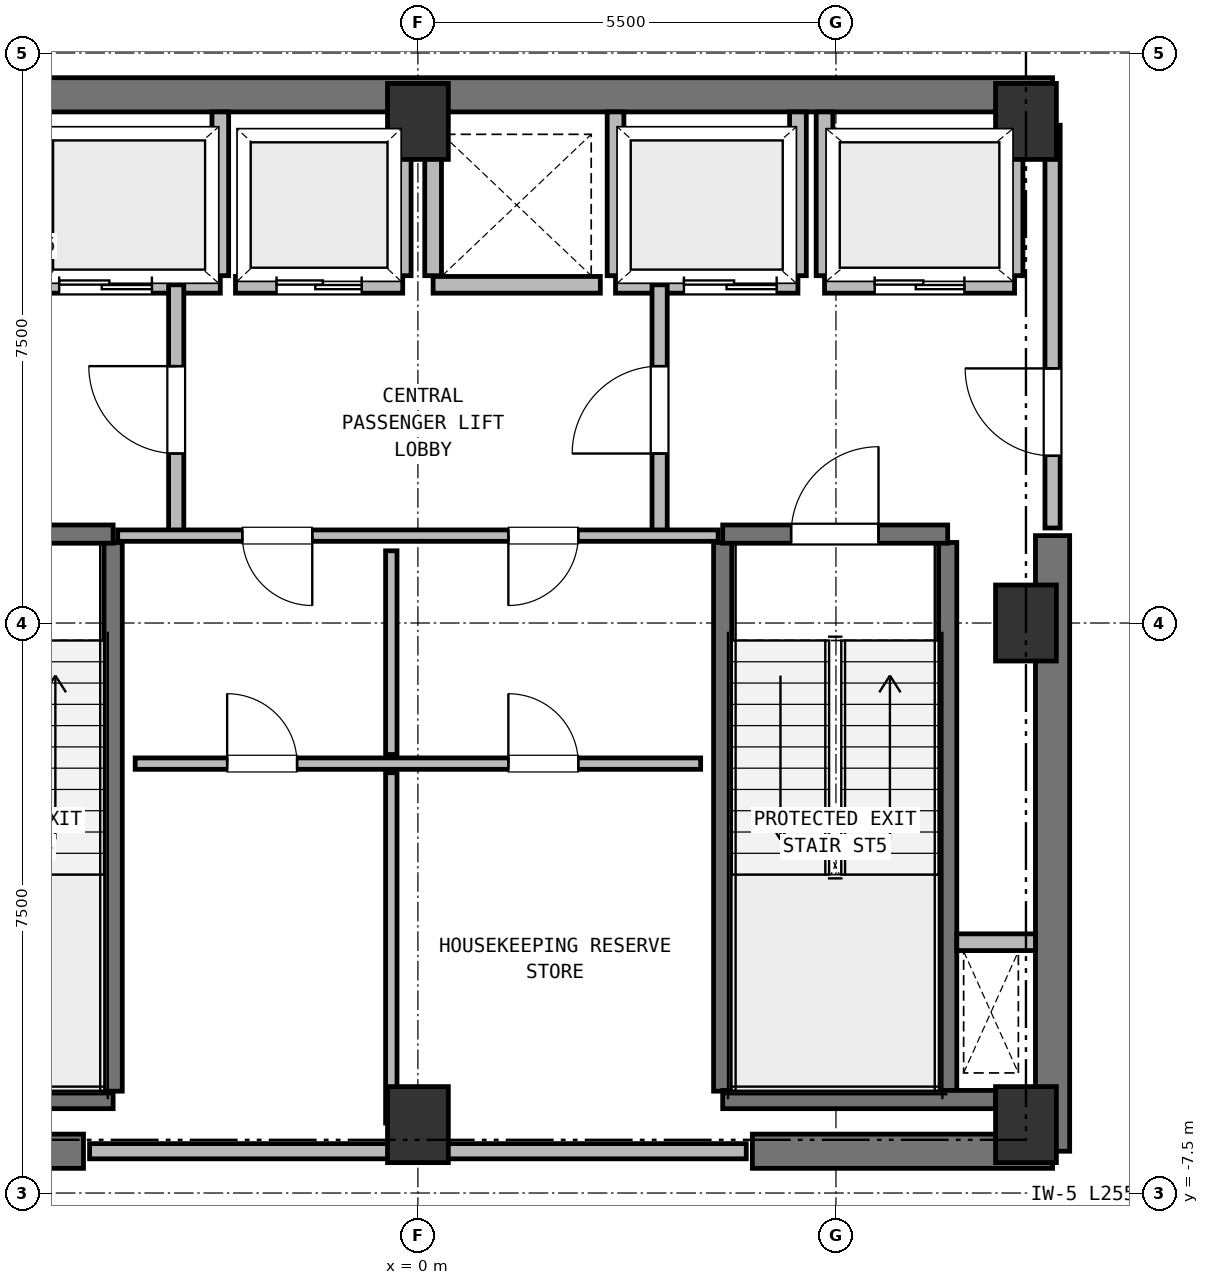
"""IFC4 building model, lengths in metres.
Left out: names, types, materials, properties, quantities, classifications, styles, units other than length and angle.
Written with IfcOpenShell. Run it as: python <this file> out.ifc"""

import sys

from ifc_helpers import new_model, si_unit, direction, frame, frame_2d, origin, origin_2d, place, context, subcontext, project, spatial, rectangle, extrude, element, fill, save


model = new_model("IFC4")
c1 = context("Model", 3, precision=1e-05, world=origin(), true_north=direction((0.0, 1.0)))
c2 = subcontext(c1, "Body", "Model", "MODEL_VIEW")
j1 = project(units=[si_unit("LENGTHUNIT", "METRE"), si_unit("PLANEANGLEUNIT", "RADIAN")], contexts=[c1])
p1 = place(None, origin())
s1 = spatial("IfcSite", under=j1, at=p1, CompositionType="ELEMENT")
p2 = place(p1, origin())
s2 = spatial("IfcBuilding", under=s1, at=p2, CompositionType="ELEMENT")
p3 = place(p2, frame((0.0, 0.0, 260.2)))
s3 = spatial("IfcBuildingStorey", under=s2, at=p3, CompositionType="ELEMENT", Elevation=260.2)
for number, where, z_axis, x_axis in (
    (1, (0.0, -6.6, 0.0), (0.0, 0.0, 1.0), (1.0, 0.0, 0.0)),
    (2, (8.0, -6.6, 0.0), (0.0, 0.0, 1.0), (1.0, 0.0, 0.0)),
    (3, (8.0, 0.0, 0.0), (0.0, 0.0, 1.0), (1.0, 0.0, 0.0)),
    (4, (8.0, 6.6, 0.0), (0.0, 0.0, 1.0), (1.0, 0.0, 0.0)),
    (5, (0.0, 6.6, 0.0), (0.0, 0.0, 1.0), (1.0, 0.0, 0.0)),
):
    element("IfcColumn", number, at=place(p3, frame(where, z_axis=z_axis, x_axis=x_axis)), inside=s3, PredefinedType="COLUMN", context=c2, shape_type="SweptSolid", body=[
        extrude(rectangle(XDim=0.8, YDim=1.0, at=origin_2d()), origin(), (0.0, 0.0, 1.0), 4.2),
    ])
p4 = place(p3, frame((-8.35, 6.95, 0.0), z_axis=(0.0, 0.0, 1.0), x_axis=(1.0, 0.0, 0.0)))
e6 = element("IfcWall", 6, at=p4, inside=s3, PredefinedType="SHEAR", context=c2, shape_type="SweptSolid", body=[
    extrude(rectangle(XDim=16.7, YDim=0.45, at=frame_2d((8.35, 0.0))), origin(), (0.0, 0.0, 1.0), 3.95),
])
for number, where, z_axis, x_axis in (
    (7, (-8.35, -6.95, 0.0), (0.0, 0.0, 1.0), (1.0, 0.0, 0.0)),
    (8, (4.4, -6.95, 0.0), (0.0, 0.0, 1.0), (1.0, 0.0, 0.0)),
):
    element("IfcWall", number, at=place(p3, frame(where, z_axis=z_axis, x_axis=x_axis)), inside=s3, PredefinedType="SHEAR", context=c2, shape_type="SweptSolid", body=[
        extrude(rectangle(XDim=3.95, YDim=0.45, at=frame_2d((1.975, 0.0))), origin(), (0.0, 0.0, 1.0), 3.95),
    ])
p5 = place(p3, frame((8.35, -6.95, 0.0), z_axis=(0.0, 0.0, 1.0), x_axis=(0.0, 1.0, 0.0)))
e9 = element("IfcWall", 9, at=p5, inside=s3, PredefinedType="SHEAR", context=c2, shape_type="SweptSolid", body=[
    extrude(rectangle(XDim=8.1, YDim=0.45, at=frame_2d((4.05, 0.0))), origin(), (0.0, 0.0, 1.0), 3.95),
])
p6 = place(p3, frame((-7.6, -6.27, 0.0), z_axis=(0.0, 0.0, 1.0), x_axis=(1.0, 0.0, 0.0)))
e10 = element("IfcWall", 10, at=p6, inside=s3, PredefinedType="SHEAR", context=c2, shape_type="SweptSolid", body=[
    extrude(rectangle(XDim=3.59, YDim=0.24, at=frame_2d((1.795, 0.0))), origin(), (0.0, 0.0, 1.0), 3.95),
])
p7 = place(p3, frame((-4.01, -6.16, 0.0), z_axis=(0.0, 0.0, 1.0), x_axis=(0.0, 1.0, 0.0)))
e11 = element("IfcWall", 11, at=p7, inside=s3, PredefinedType="SHEAR", context=c2, shape_type="SweptSolid", body=[
    extrude(rectangle(XDim=7.22, YDim=0.24, at=frame_2d((3.61, 0.0))), origin(), (0.0, 0.0, 1.0), 3.95),
])
p8 = place(p3, frame((-6.97, 1.17, 0.0), z_axis=(0.0, 0.0, 1.0), x_axis=(1.0, 0.0, 0.0)))
e12 = element("IfcWall", 12, at=p8, inside=s3, PredefinedType="SHEAR", context=c2, shape_type="SweptSolid", body=[
    extrude(rectangle(XDim=2.96, YDim=0.24, at=frame_2d((1.48, 0.0))), origin(), (0.0, 0.0, 1.0), 3.95),
])
p9 = place(p8, frame((0.9, 0.0, 0.0)))
e13 = element("IfcOpeningElement", 13, at=p9, cuts=e12, PredefinedType="OPENING", context=c2, shape_type="SweptSolid", body=[
    extrude(rectangle(XDim=1.15, YDim=2.15, at=frame_2d((0.575, 1.075))), frame((0.0, 0.13, 0.0), z_axis=(0.0, -1.0, 0.0), x_axis=(1.0, 0.0, 0.0)), (0.0, 0.0, 1.0), 0.26),
])
for number, where, z_axis, x_axis in (
    (14, (4.01, -6.16, 0.0), (0.0, 0.0, 1.0), (0.0, 1.0, 0.0)),
    (15, (6.97, -6.16, 0.0), (0.0, 0.0, 1.0), (0.0, 1.0, 0.0)),
):
    element("IfcWall", number, at=place(p3, frame(where, z_axis=z_axis, x_axis=x_axis)), inside=s3, PredefinedType="SHEAR", context=c2, shape_type="SweptSolid", body=[
        extrude(rectangle(XDim=7.22, YDim=0.24, at=frame_2d((3.61, 0.0))), origin(), (0.0, 0.0, 1.0), 3.95),
    ])
p10 = place(p3, frame((4.01, -6.27, 0.0), z_axis=(0.0, 0.0, 1.0), x_axis=(1.0, 0.0, 0.0)))
e16 = element("IfcWall", 16, at=p10, inside=s3, PredefinedType="SHEAR", context=c2, shape_type="SweptSolid", body=[
    extrude(rectangle(XDim=3.59, YDim=0.24, at=frame_2d((1.795, 0.0))), origin(), (0.0, 0.0, 1.0), 3.95),
])
p11 = place(p3, frame((4.01, 1.17, 0.0), z_axis=(0.0, 0.0, 1.0), x_axis=(1.0, 0.0, 0.0)))
e17 = element("IfcWall", 17, at=p11, inside=s3, PredefinedType="SHEAR", context=c2, shape_type="SweptSolid", body=[
    extrude(rectangle(XDim=2.96, YDim=0.24, at=frame_2d((1.48, 0.0))), origin(), (0.0, 0.0, 1.0), 3.95),
])
p12 = place(p11, frame((0.9, 0.0, 0.0)))
e18 = element("IfcOpeningElement", 18, at=p12, cuts=e17, PredefinedType="OPENING", context=c2, shape_type="SweptSolid", body=[
    extrude(rectangle(XDim=1.15, YDim=2.15, at=frame_2d((0.575, 1.075))), frame((0.0, 0.13, 0.0), z_axis=(0.0, -1.0, 0.0), x_axis=(1.0, 0.0, 0.0)), (0.0, 0.0, 1.0), 0.26),
])
p13 = place(p3, frame((7.09, -4.2, 0.0), z_axis=(0.0, 0.0, 1.0), x_axis=(1.0, 0.0, 0.0)))
e19 = element("IfcWall", 19, at=p13, inside=s3, PredefinedType="PARTITIONING", context=c2, shape_type="SweptSolid", body=[
    extrude(rectangle(XDim=1.035, YDim=0.22, at=frame_2d((0.518, 0.0))), origin(), (0.0, 0.0, 1.0), 3.95),
])
p14 = place(p3, frame((5.35, 4.45, 0.0), z_axis=(0.0, 0.0, 1.0), x_axis=(1.0, 0.0, 0.0)))
e20 = element("IfcWall", 20, at=p14, inside=s3, PredefinedType="PARTITIONING", context=c2, shape_type="SweptSolid", body=[
    extrude(rectangle(XDim=2.5, YDim=0.22, at=frame_2d((1.25, 0.0))), origin(), (0.0, 0.0, 1.0), 3.95),
])
p15 = place(p14, frame((0.66, 0.0, 0.0)))
e21 = element("IfcOpeningElement", 21, at=p15, cuts=e20, PredefinedType="OPENING", context=c2, shape_type="SweptSolid", body=[
    extrude(rectangle(XDim=1.18, YDim=2.15, at=frame_2d((0.59, 1.075))), frame((0.0, 0.12, 0.0), z_axis=(0.0, -1.0, 0.0), x_axis=(1.0, 0.0, 0.0)), (0.0, 0.0, 1.0), 0.24),
])
p16 = place(p3, frame((5.35, 4.57, 0.0), z_axis=(0.0, 0.0, 1.0), x_axis=(0.0, 1.0, 0.0)))
e22 = element("IfcWall", 22, at=p16, inside=s3, PredefinedType="PARTITIONING", context=c2, shape_type="SweptSolid", body=[
    extrude(rectangle(XDim=2.155, YDim=0.22, at=frame_2d((1.078, 0.0))), origin(), (0.0, 0.0, 1.0), 3.95),
])
p17 = place(p3, frame((7.85, 4.57, 0.0), z_axis=(0.0, 0.0, 1.0), x_axis=(0.0, 1.0, 0.0)))
e23 = element("IfcWall", 23, at=p17, inside=s3, PredefinedType="PARTITIONING", context=c2, shape_type="SweptSolid", body=[
    extrude(rectangle(XDim=2.155, YDim=0.22, at=frame_2d((1.078, 0.0))), origin(), (0.0, 0.0, 1.0), 3.63),
])
p18 = place(p3, frame((-5.0, 4.45, 0.0), z_axis=(0.0, 0.0, 1.0), x_axis=(1.0, 0.0, 0.0)))
e24 = element("IfcWall", 24, at=p18, inside=s3, PredefinedType="PARTITIONING", context=c2, shape_type="SweptSolid", body=[
    extrude(rectangle(XDim=2.4, YDim=0.22, at=frame_2d((1.2, 0.0))), origin(), (0.0, 0.0, 1.0), 3.95),
])
p19 = place(p18, frame((0.28, 0.0, 0.0)))
e25 = element("IfcOpeningElement", 25, at=p19, cuts=e24, PredefinedType="OPENING", context=c2, shape_type="SweptSolid", body=[
    extrude(rectangle(XDim=1.22, YDim=2.15, at=frame_2d((0.61, 1.075))), frame((0.0, 0.12, 0.0), z_axis=(0.0, -1.0, 0.0), x_axis=(1.0, 0.0, 0.0)), (0.0, 0.0, 1.0), 0.24),
])
p20 = place(p3, frame((-2.6, 4.57, 0.0), z_axis=(0.0, 0.0, 1.0), x_axis=(0.0, 1.0, 0.0)))
e26 = element("IfcWall", 26, at=p20, inside=s3, PredefinedType="PARTITIONING", context=c2, shape_type="SweptSolid", body=[
    extrude(rectangle(XDim=2.155, YDim=0.22, at=frame_2d((1.078, 0.0))), origin(), (0.0, 0.0, 1.0), 3.95),
])
p21 = place(p3, frame((2.6, 4.45, 0.0), z_axis=(0.0, 0.0, 1.0), x_axis=(1.0, 0.0, 0.0)))
e27 = element("IfcWall", 27, at=p21, inside=s3, PredefinedType="PARTITIONING", context=c2, shape_type="SweptSolid", body=[
    extrude(rectangle(XDim=2.4, YDim=0.22, at=frame_2d((1.2, 0.0))), origin(), (0.0, 0.0, 1.0), 3.95),
])
p22 = place(p21, frame((0.9, 0.0, 0.0)))
e28 = element("IfcOpeningElement", 28, at=p22, cuts=e27, PredefinedType="OPENING", context=c2, shape_type="SweptSolid", body=[
    extrude(rectangle(XDim=1.22, YDim=2.15, at=frame_2d((0.61, 1.075))), frame((0.0, 0.12, 0.0), z_axis=(0.0, -1.0, 0.0), x_axis=(1.0, 0.0, 0.0)), (0.0, 0.0, 1.0), 0.24),
])
for number, where, z_axis, x_axis in (
    (29, (2.6, 4.57, 0.0), (0.0, 0.0, 1.0), (0.0, 1.0, 0.0)),
    (30, (5.0, 4.57, 0.0), (0.0, 0.0, 1.0), (0.0, 1.0, 0.0)),
):
    element("IfcWall", number, at=place(p3, frame(where, z_axis=z_axis, x_axis=x_axis)), inside=s3, PredefinedType="PARTITIONING", context=c2, shape_type="SweptSolid", body=[
        extrude(rectangle(XDim=2.155, YDim=0.22, at=frame_2d((1.078, 0.0))), origin(), (0.0, 0.0, 1.0), 3.95),
    ])
p23 = place(p3, frame((-2.4, 4.45, 0.0), z_axis=(0.0, 0.0, 1.0), x_axis=(1.0, 0.0, 0.0)))
e31 = element("IfcWall", 31, at=p23, inside=s3, PredefinedType="PARTITIONING", context=c2, shape_type="SweptSolid", body=[
    extrude(rectangle(XDim=2.2, YDim=0.22, at=frame_2d((1.1, 0.0))), origin(), (0.0, 0.0, 1.0), 3.95),
])
p24 = place(p23, frame((0.54, 0.0, 0.0)))
e32 = element("IfcOpeningElement", 32, at=p24, cuts=e31, PredefinedType="OPENING", context=c2, shape_type="SweptSolid", body=[
    extrude(rectangle(XDim=1.12, YDim=2.15, at=frame_2d((0.56, 1.075))), frame((0.0, 0.12, 0.0), z_axis=(0.0, -1.0, 0.0), x_axis=(1.0, 0.0, 0.0)), (0.0, 0.0, 1.0), 0.24),
])
p25 = place(p3, frame((-0.2, 4.57, 0.0), z_axis=(0.0, 0.0, 1.0), x_axis=(0.0, 1.0, 0.0)))
e33 = element("IfcWall", 33, at=p25, inside=s3, PredefinedType="PARTITIONING", context=c2, shape_type="SweptSolid", body=[
    extrude(rectangle(XDim=2.155, YDim=0.22, at=frame_2d((1.078, 0.0))), origin(), (0.0, 0.0, 1.0), 3.95),
])
p26 = place(p3, frame((0.2, 4.45, 0.0), z_axis=(0.0, 0.0, 1.0), x_axis=(1.0, 0.0, 0.0)))
e34 = element("IfcWall", 34, at=p26, inside=s3, PredefinedType="PARTITIONING", context=c2, shape_type="SweptSolid", body=[
    extrude(rectangle(XDim=2.2, YDim=0.22, at=frame_2d((1.1, 0.0))), origin(), (0.0, 0.0, 1.0), 3.95),
])
p27 = place(p3, frame((0.2, 4.57, 0.0), z_axis=(0.0, 0.0, 1.0), x_axis=(0.0, 1.0, 0.0)))
e35 = element("IfcWall", 35, at=p27, inside=s3, PredefinedType="PARTITIONING", context=c2, shape_type="SweptSolid", body=[
    extrude(rectangle(XDim=2.155, YDim=0.22, at=frame_2d((1.078, 0.0))), origin(), (0.0, 0.0, 1.0), 3.95),
])
p28 = place(p3, frame((-3.18, 1.15, 0.0), z_axis=(0.0, 0.0, 1.0), x_axis=(0.0, 1.0, 0.0)))
e36 = element("IfcWall", 36, at=p28, inside=s3, PredefinedType="PARTITIONING", context=c2, shape_type="SweptSolid", body=[
    extrude(rectangle(XDim=3.3, YDim=0.2, at=frame_2d((1.65, 0.0))), origin(), (0.0, 0.0, 1.0), 3.95),
])
p29 = place(p28, frame((1.08, 0.0, 0.0)))
e37 = element("IfcOpeningElement", 37, at=p29, cuts=e36, PredefinedType="OPENING", context=c2, shape_type="SweptSolid", body=[
    extrude(rectangle(XDim=1.15, YDim=2.15, at=frame_2d((0.575, 1.075))), frame((0.0, 0.11, 0.0), z_axis=(0.0, -1.0, 0.0), x_axis=(1.0, 0.0, 0.0)), (0.0, 0.0, 1.0), 0.22),
])
p30 = place(p3, frame((3.18, 1.15, 0.0), z_axis=(0.0, 0.0, 1.0), x_axis=(0.0, 1.0, 0.0)))
e38 = element("IfcWall", 38, at=p30, inside=s3, PredefinedType="PARTITIONING", context=c2, shape_type="SweptSolid", body=[
    extrude(rectangle(XDim=3.3, YDim=0.2, at=frame_2d((1.65, 0.0))), origin(), (0.0, 0.0, 1.0), 3.95),
])
p31 = place(p30, frame((1.08, 0.0, 0.0)))
e39 = element("IfcOpeningElement", 39, at=p31, cuts=e38, PredefinedType="OPENING", context=c2, shape_type="SweptSolid", body=[
    extrude(rectangle(XDim=1.15, YDim=2.15, at=frame_2d((0.575, 1.075))), frame((0.0, 0.11, 0.0), z_axis=(0.0, -1.0, 0.0), x_axis=(1.0, 0.0, 0.0)), (0.0, 0.0, 1.0), 0.22),
])
p32 = place(p3, frame((8.35, 1.25, 0.0), z_axis=(0.0, 0.0, 1.0), x_axis=(0.0, 1.0, 0.0)))
e40 = element("IfcWall", 40, at=p32, inside=s3, PredefinedType="PARTITIONING", context=c2, shape_type="SweptSolid", body=[
    extrude(rectangle(XDim=5.3, YDim=0.2, at=frame_2d((2.65, 0.0))), origin(), (0.0, 0.0, 1.0), 3.95),
])
p33 = place(p32, frame((0.95, 0.0, 0.0)))
e41 = element("IfcOpeningElement", 41, at=p33, cuts=e40, PredefinedType="OPENING", context=c2, shape_type="SweptSolid", body=[
    extrude(rectangle(XDim=1.15, YDim=2.15, at=frame_2d((0.575, 1.075))), frame((0.0, 0.11, 0.0), z_axis=(0.0, -1.0, 0.0), x_axis=(1.0, 0.0, 0.0)), (0.0, 0.0, 1.0), 0.22),
])
p34 = place(p3, frame((3.95, 1.15, 0.0), z_axis=(0.0, 0.0, 1.0), x_axis=(-1.0, 0.0, 0.0)))
e42 = element("IfcWall", 42, at=p34, inside=s3, PredefinedType="PARTITIONING", context=c2, shape_type="SweptSolid", body=[
    extrude(rectangle(XDim=7.9, YDim=0.15, at=frame_2d((3.95, 0.0))), origin(), (0.0, 0.0, 1.0), 3.95),
])
p35 = place(p34, frame((5.34, 0.0, 0.0)))
e43 = element("IfcOpeningElement", 43, at=p35, cuts=e42, PredefinedType="OPENING", context=c2, shape_type="SweptSolid", body=[
    extrude(rectangle(XDim=0.92, YDim=2.05, at=frame_2d((0.46, 1.025))), frame((0.0, 0.085, 0.0), z_axis=(0.0, -1.0, 0.0), x_axis=(1.0, 0.0, 0.0)), (0.0, 0.0, 1.0), 0.17),
])
p36 = place(p34, frame((1.84, 0.0, 0.0)))
e44 = element("IfcOpeningElement", 44, at=p36, cuts=e42, PredefinedType="OPENING", context=c2, shape_type="SweptSolid", body=[
    extrude(rectangle(XDim=0.92, YDim=2.05, at=frame_2d((0.46, 1.025))), frame((0.0, 0.085, 0.0), z_axis=(0.0, -1.0, 0.0), x_axis=(1.0, 0.0, 0.0)), (0.0, 0.0, 1.0), 0.17),
])
p37 = place(p3, frame((-4.32, -6.95, 0.0), z_axis=(0.0, 0.0, 1.0), x_axis=(1.0, 0.0, 0.0)))
e45 = element("IfcWall", 45, at=p37, inside=s3, PredefinedType="PARTITIONING", context=c2, shape_type="SweptSolid", body=[
    extrude(rectangle(XDim=8.64, YDim=0.2, at=frame_2d((4.32, 0.0))), origin(), (0.0, 0.0, 1.0), 3.95),
])
p38 = place(p3, frame((-3.72, -1.85, 0.0), z_axis=(0.0, 0.0, 1.0), x_axis=(1.0, 0.0, 0.0)))
e46 = element("IfcWall", 46, at=p38, inside=s3, PredefinedType="PARTITIONING", context=c2, shape_type="SweptSolid", body=[
    extrude(rectangle(XDim=7.44, YDim=0.15, at=frame_2d((3.72, 0.0))), origin(), (0.0, 0.0, 1.0), 3.95),
])
p39 = place(p38, frame((1.21, 0.0, 0.0)))
e47 = element("IfcOpeningElement", 47, at=p39, cuts=e46, PredefinedType="OPENING", context=c2, shape_type="SweptSolid", body=[
    extrude(rectangle(XDim=0.92, YDim=2.05, at=frame_2d((0.46, 1.025))), frame((0.0, 0.085, 0.0), z_axis=(0.0, -1.0, 0.0), x_axis=(1.0, 0.0, 0.0)), (0.0, 0.0, 1.0), 0.17),
])
p40 = place(p38, frame((4.91, 0.0, 0.0)))
e48 = element("IfcOpeningElement", 48, at=p40, cuts=e46, PredefinedType="OPENING", context=c2, shape_type="SweptSolid", body=[
    extrude(rectangle(XDim=0.92, YDim=2.05, at=frame_2d((0.46, 1.025))), frame((0.0, 0.085, 0.0), z_axis=(0.0, -1.0, 0.0), x_axis=(1.0, 0.0, 0.0)), (0.0, 0.0, 1.0), 0.17),
])
p41 = place(p3, frame((-0.35, -6.58, 0.0), z_axis=(0.0, 0.0, 1.0), x_axis=(0.0, 1.0, 0.0)))
e49 = element("IfcWall", 49, at=p41, inside=s3, PredefinedType="PARTITIONING", context=c2, shape_type="SweptSolid", body=[
    extrude(rectangle(XDim=4.61, YDim=0.15, at=frame_2d((2.305, 0.0))), origin(), (0.0, 0.0, 1.0), 3.95),
])
p42 = place(p3, frame((-0.35, -1.73, 0.0), z_axis=(0.0, 0.0, 1.0), x_axis=(0.0, 1.0, 0.0)))
e50 = element("IfcWall", 50, at=p42, inside=s3, PredefinedType="PARTITIONING", context=c2, shape_type="SweptSolid", body=[
    extrude(rectangle(XDim=2.68, YDim=0.15, at=frame_2d((1.34, 0.0))), origin(), (0.0, 0.0, 1.0), 3.95),
])
p43 = place(p3, frame((10.422, -7.309, 0.0), z_axis=(0.0, 0.0, 1.0), x_axis=(-0.693764562202, -0.720201869085, 0.0)))
e51 = element("IfcWall", 51, at=p43, inside=s3, PredefinedType="PARTITIONING", context=c2, shape_type="SweptSolid", body=[
    extrude(rectangle(XDim=2.558, YDim=0.15, at=frame_2d((1.279, 0.0))), origin(), (0.0, 0.0, 1.0), 3.95),
])
p44 = place(p12, origin())
e52 = element("IfcDoor", 52, at=p44, inside=s3, OperationType="SINGLE_SWING_RIGHT", PredefinedType="DOOR", context=c2, shape_type="SweptSolid", body=[
    extrude(rectangle(XDim=1.15, YDim=2.15, at=frame_2d((0.575, 1.075))), frame((0.0, 0.025, 0.0), z_axis=(0.0, -1.0, 0.0), x_axis=(1.0, 0.0, 0.0)), (0.0, 0.0, 1.0), 0.05),
])
fill(e18, e52)
p45 = place(p15, origin())
e53 = element("IfcDoor", 53, at=p45, inside=s3, OperationType="DOUBLE_DOOR_SLIDING", PredefinedType="DOOR", context=c2, shape_type="SweptSolid", body=[
    extrude(rectangle(XDim=1.18, YDim=2.15, at=frame_2d((0.59, 1.075))), frame((0.0, 0.025, 0.0), z_axis=(0.0, -1.0, 0.0), x_axis=(1.0, 0.0, 0.0)), (0.0, 0.0, 1.0), 0.05),
])
fill(e21, e53)
p46 = place(p19, origin())
e54 = element("IfcDoor", 54, at=p46, inside=s3, OperationType="DOUBLE_DOOR_SLIDING", PredefinedType="DOOR", context=c2, shape_type="SweptSolid", body=[
    extrude(rectangle(XDim=1.22, YDim=2.15, at=frame_2d((0.61, 1.075))), frame((0.0, 0.025, 0.0), z_axis=(0.0, -1.0, 0.0), x_axis=(1.0, 0.0, 0.0)), (0.0, 0.0, 1.0), 0.05),
])
fill(e25, e54)
p47 = place(p22, origin())
e55 = element("IfcDoor", 55, at=p47, inside=s3, OperationType="DOUBLE_DOOR_SLIDING", PredefinedType="DOOR", context=c2, shape_type="SweptSolid", body=[
    extrude(rectangle(XDim=1.22, YDim=2.15, at=frame_2d((0.61, 1.075))), frame((0.0, 0.025, 0.0), z_axis=(0.0, -1.0, 0.0), x_axis=(1.0, 0.0, 0.0)), (0.0, 0.0, 1.0), 0.05),
])
fill(e28, e55)
p48 = place(p24, origin())
e56 = element("IfcDoor", 56, at=p48, inside=s3, OperationType="DOUBLE_DOOR_SLIDING", PredefinedType="DOOR", context=c2, shape_type="SweptSolid", body=[
    extrude(rectangle(XDim=1.12, YDim=2.15, at=frame_2d((0.56, 1.075))), frame((0.0, 0.025, 0.0), z_axis=(0.0, -1.0, 0.0), x_axis=(1.0, 0.0, 0.0)), (0.0, 0.0, 1.0), 0.05),
])
fill(e32, e56)
p49 = place(p29, origin())
e57 = element("IfcDoor", 57, at=p49, inside=s3, OperationType="SINGLE_SWING_RIGHT", PredefinedType="DOOR", context=c2, shape_type="SweptSolid", body=[
    extrude(rectangle(XDim=1.15, YDim=2.15, at=frame_2d((0.575, 1.075))), frame((0.0, 0.025, 0.0), z_axis=(0.0, -1.0, 0.0), x_axis=(1.0, 0.0, 0.0)), (0.0, 0.0, 1.0), 0.05),
])
fill(e37, e57)
p50 = place(p31, origin())
e58 = element("IfcDoor", 58, at=p50, inside=s3, OperationType="SINGLE_SWING_LEFT", PredefinedType="DOOR", context=c2, shape_type="SweptSolid", body=[
    extrude(rectangle(XDim=1.15, YDim=2.15, at=frame_2d((0.575, 1.075))), frame((0.0, 0.025, 0.0), z_axis=(0.0, -1.0, 0.0), x_axis=(1.0, 0.0, 0.0)), (0.0, 0.0, 1.0), 0.05),
])
fill(e39, e58)
p51 = place(p33, origin())
e59 = element("IfcDoor", 59, at=p51, inside=s3, OperationType="SINGLE_SWING_RIGHT", PredefinedType="DOOR", context=c2, shape_type="SweptSolid", body=[
    extrude(rectangle(XDim=1.15, YDim=2.15, at=frame_2d((0.575, 1.075))), frame((0.0, 0.025, 0.0), z_axis=(0.0, -1.0, 0.0), x_axis=(1.0, 0.0, 0.0)), (0.0, 0.0, 1.0), 0.05),
])
fill(e41, e59)
p52 = place(p35, origin())
e60 = element("IfcDoor", 60, at=p52, inside=s3, OperationType="SINGLE_SWING_LEFT", PredefinedType="DOOR", context=c2, shape_type="SweptSolid", body=[
    extrude(rectangle(XDim=0.92, YDim=2.05, at=frame_2d((0.46, 1.025))), frame((0.0, 0.025, 0.0), z_axis=(0.0, -1.0, 0.0), x_axis=(1.0, 0.0, 0.0)), (0.0, 0.0, 1.0), 0.05),
])
fill(e43, e60)
p53 = place(p36, origin())
e61 = element("IfcDoor", 61, at=p53, inside=s3, OperationType="SINGLE_SWING_RIGHT", PredefinedType="DOOR", context=c2, shape_type="SweptSolid", body=[
    extrude(rectangle(XDim=0.92, YDim=2.05, at=frame_2d((0.46, 1.025))), frame((0.0, 0.025, 0.0), z_axis=(0.0, -1.0, 0.0), x_axis=(1.0, 0.0, 0.0)), (0.0, 0.0, 1.0), 0.05),
])
fill(e44, e61)
p54 = place(p39, origin())
e62 = element("IfcDoor", 62, at=p54, inside=s3, OperationType="SINGLE_SWING_LEFT", PredefinedType="DOOR", context=c2, shape_type="SweptSolid", body=[
    extrude(rectangle(XDim=0.92, YDim=2.05, at=frame_2d((0.46, 1.025))), frame((0.0, 0.025, 0.0), z_axis=(0.0, -1.0, 0.0), x_axis=(1.0, 0.0, 0.0)), (0.0, 0.0, 1.0), 0.05),
])
fill(e47, e62)
p55 = place(p40, origin())
e63 = element("IfcDoor", 63, at=p55, inside=s3, OperationType="SINGLE_SWING_LEFT", PredefinedType="DOOR", context=c2, shape_type="SweptSolid", body=[
    extrude(rectangle(XDim=0.92, YDim=2.05, at=frame_2d((0.46, 1.025))), frame((0.0, 0.025, 0.0), z_axis=(0.0, -1.0, 0.0), x_axis=(1.0, 0.0, 0.0)), (0.0, 0.0, 1.0), 0.05),
])
fill(e48, e63)
save(model, sys.argv[1])
